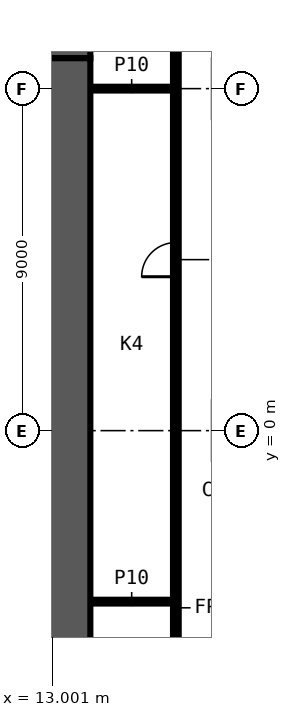
"""IFC4 building model, lengths in metres.
Left out: names, types, materials, properties, quantities, classifications, styles, units other than length and angle.
Written with IfcOpenShell. Run it as: python <this file> out.ifc"""

import sys

from ifc_helpers import new_model, si_unit, direction, frame, frame_2d, origin, place, context, subcontext, project, spatial, rectangle, extrude, element, fill, save


model = new_model("IFC4")
c1 = context("Model", 3, precision=1e-05, world=origin(), true_north=direction((0.0, 1.0)))
c2 = subcontext(c1, "Body", "Model", "MODEL_VIEW")
j1 = project(units=[si_unit("LENGTHUNIT", "METRE"), si_unit("PLANEANGLEUNIT", "RADIAN")], contexts=[c1])
p1 = place(None, origin())
s1 = spatial("IfcSite", under=j1, at=p1, CompositionType="ELEMENT")
p2 = place(p1, origin())
s2 = spatial("IfcBuilding", under=s1, at=p2, CompositionType="ELEMENT")
p3 = place(p2, frame((0.0, 0.0, 77.3)))
s3 = spatial("IfcBuildingStorey", under=s2, at=p3, CompositionType="ELEMENT", Elevation=77.3)
for number, where, z_axis, x_axis in (
    (1, (14.0, -4.5, 0.0), (0.0, 0.0, 1.0), (1.0, 0.0, 0.0)),
    (2, (14.0, 9.0, 0.0), (0.0, 0.0, 1.0), (1.0, 0.0, 0.0)),
):
    element("IfcWall", number, at=place(p3, frame(where, z_axis=z_axis, x_axis=x_axis)), inside=s3, PredefinedType="PARTITIONING", context=c2, shape_type="SweptSolid", body=[
        extrude(rectangle(XDim=2.175, YDim=0.1, at=frame_2d((1.087, 0.0))), origin(), (0.0, 0.0, 1.0), 3.3),
    ])
p4 = place(p3, frame((16.25, -13.175, 0.0), z_axis=(0.0, 0.0, 1.0), x_axis=(0.0, 1.0, 0.0)))
e3 = element("IfcWall", 3, at=p4, inside=s3, PredefinedType="PARTITIONING", context=c2, shape_type="SweptSolid", body=[
    extrude(rectangle(XDim=26.35, YDim=0.15, at=frame_2d((13.175, 0.0))), origin(), (0.0, 0.0, 1.0), 3.3),
])
p5 = place(p4, frame((17.225, 0.0, 0.0)))
e4 = element("IfcOpeningElement", 4, at=p5, cuts=e3, PredefinedType="OPENING", context=c2, shape_type="SweptSolid", body=[
    extrude(rectangle(XDim=0.9, YDim=2.1, at=frame_2d((0.45, 1.05))), frame((0.0, 0.085, 0.0), z_axis=(0.0, -1.0, 0.0), x_axis=(1.0, 0.0, 0.0)), (0.0, 0.0, 1.0), 0.17),
])
p6 = place(p3, frame((-14.0, 10.4, 0.0), z_axis=(0.0, 0.0, 1.0), x_axis=(1.0, 0.0, 0.0)))
e5 = element("IfcWall", 5, at=p6, inside=s3, PredefinedType="SHEAR", context=c2, shape_type="SweptSolid", body=[
    extrude(rectangle(XDim=28.0, YDim=1.2, at=frame_2d((14.0, 0.0))), origin(), (0.0, 0.0, 1.0), 3.3),
])
p7 = place(p6, frame((15.9, 0.0, 0.0)))
e6 = element("IfcOpeningElement", 6, at=p7, cuts=e5, PredefinedType="OPENING", context=c2, shape_type="SweptSolid", body=[
    extrude(rectangle(XDim=1.6, YDim=2.1, at=frame_2d((0.8, 1.05))), frame((0.0, 0.61, 0.0), z_axis=(0.0, -1.0, 0.0), x_axis=(1.0, 0.0, 0.0)), (0.0, 0.0, 1.0), 1.22),
])
p8 = place(p3, frame((13.4, 9.8, 0.0), z_axis=(0.0, 0.0, 1.0), x_axis=(0.0, -1.0, 0.0)))
e7 = element("IfcWall", 7, at=p8, inside=s3, PredefinedType="SHEAR", context=c2, shape_type="SweptSolid", body=[
    extrude(rectangle(XDim=19.6, YDim=1.2, at=frame_2d((9.8, 0.0))), origin(), (0.0, 0.0, 1.0), 3.3),
])
p9 = place(p5, origin())
e8 = element("IfcDoor", 8, at=p9, inside=s3, OperationType="SINGLE_SWING_LEFT", PredefinedType="DOOR", context=c2, shape_type="SweptSolid", body=[
    extrude(rectangle(XDim=0.9, YDim=2.1, at=frame_2d((0.45, 1.05))), frame((0.0, 0.025, 0.0), z_axis=(0.0, -1.0, 0.0), x_axis=(1.0, 0.0, 0.0)), (0.0, 0.0, 1.0), 0.05),
])
fill(e4, e8)
save(model, sys.argv[1])
